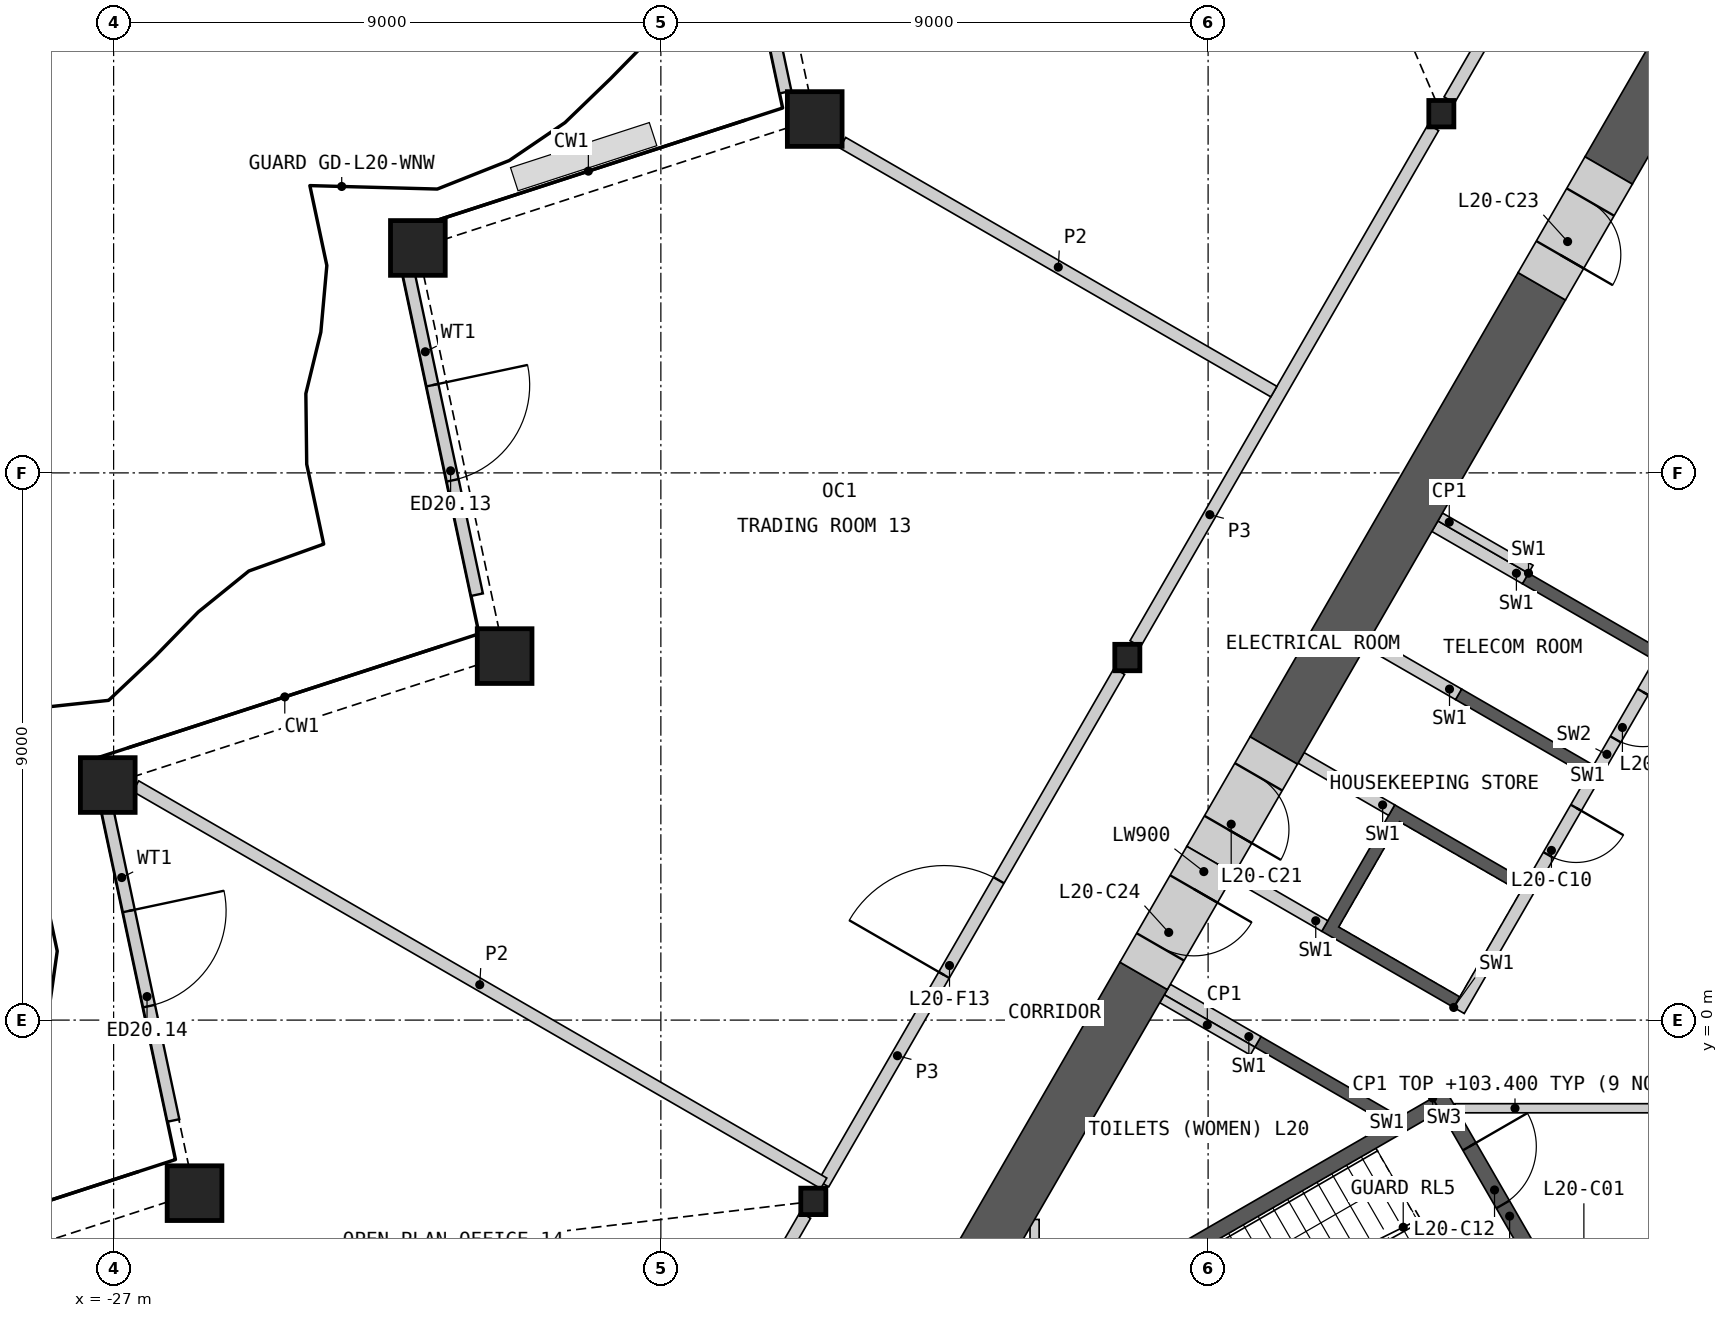
"""IFC4 building model, lengths in metres.
Left out: names, types, materials, properties, quantities, classifications, styles, units other than length and angle.
Written with IfcOpenShell. Run it as: python <this file> out.ifc"""

import sys

from ifc_helpers import new_model, si_unit, direction, frame, frame_2d, origin, origin_2d, place, context, subcontext, project, spatial, polyline, rectangle, hollow_rectangle, i_section, outline, extrude, element, fill, save


model = new_model("IFC4")
c1 = context("Model", 3, precision=1e-05, world=origin(), true_north=direction((0.0, 1.0)))
c2 = subcontext(c1, "Body", "Model", "MODEL_VIEW")
j1 = project(units=[si_unit("LENGTHUNIT", "METRE"), si_unit("PLANEANGLEUNIT", "RADIAN")], contexts=[c1])
p1 = place(None, origin())
s1 = spatial("IfcSite", under=j1, at=p1, CompositionType="ELEMENT")
p2 = place(p1, origin())
s2 = spatial("IfcBuilding", under=s1, at=p2, CompositionType="ELEMENT")
p3 = place(p2, frame((0.0, 0.0, 99.6)))
s3 = spatial("IfcBuildingStorey", under=s2, at=p3, CompositionType="ELEMENT", Elevation=99.6)
for number, where, z_axis, x_axis in (
    (1, (-15.469, 14.82, 0.0), (0.0, 0.0, 1.0), (1.0, 0.0, 0.0)),
    (2, (-21.996, 12.699, 0.0), (0.0, 0.0, 1.0), (1.0, 0.0, 0.0)),
    (3, (-20.57, 5.987, 0.0), (0.0, 0.0, 1.0), (1.0, 0.0, 0.0)),
    (4, (-27.096, 3.866, 0.0), (0.0, 0.0, 1.0), (1.0, 0.0, 0.0)),
    (5, (-25.669, -2.846, 0.0), (0.0, 0.0, 1.0), (1.0, 0.0, 0.0)),
):
    element("IfcColumn", number, at=place(p3, frame(where, z_axis=z_axis, x_axis=x_axis)), inside=s3, PredefinedType="COLUMN", context=c2, shape_type="SweptSolid", body=[
        extrude(hollow_rectangle(XDim=0.9, YDim=0.9, WallThickness=0.06, at=origin_2d()), origin(), (0.0, 0.0, 1.0), 4.2),
    ])
for number, where, z_axis, x_axis in (
    (6, (-5.164, 14.908, 0.0), (0.0, 0.0, 1.0), (1.0, 0.0, 0.0)),
    (7, (-10.328, 5.963, 0.0), (0.0, 0.0, 1.0), (1.0, 0.0, 0.0)),
    (8, (-15.493, -2.982, 0.0), (0.0, 0.0, 1.0), (1.0, 0.0, 0.0)),
):
    element("IfcColumn", number, at=place(p3, frame(where, z_axis=z_axis, x_axis=x_axis)), inside=s3, PredefinedType="COLUMN", context=c2, shape_type="SweptSolid", body=[
        extrude(i_section(OverallWidth=0.412, OverallDepth=0.435, WebThickness=0.036, FlangeThickness=0.057, at=origin_2d()), origin(), (0.0, 0.0, 1.0), 4.2),
    ])
p4 = place(p3, frame((-17.185, 21.066, 0.0), z_axis=(0.0, 0.0, 1.0), x_axis=(0.207930102794, -0.978143686966, 0.0)))
e9 = element("IfcWall", 9, at=p4, inside=s3, PredefinedType="SOLIDWALL", context=c2, shape_type="SweptSolid", body=[
    extrude(rectangle(XDim=5.934, YDim=0.2, at=frame_2d((2.967, 0.0))), origin(), (0.0, 0.0, 1.0), 3.189),
])
p5 = place(p4, frame((2.02, 0.0, 0.0)))
e10 = element("IfcOpeningElement", 10, at=p5, cuts=e9, PredefinedType="OPENING", context=c2, shape_type="SweptSolid", body=[
    extrude(rectangle(XDim=1.6, YDim=2.4, at=frame_2d((0.8, 1.2))), frame((0.0, 0.11, 0.0), z_axis=(0.0, -1.0, 0.0), x_axis=(1.0, 0.0, 0.0)), (0.0, 0.0, 1.0), 0.22),
])
p6 = place(p3, frame((-22.157, 12.324, 0.0), z_axis=(0.0, 0.0, 1.0), x_axis=(0.207903253291, -0.978149394148, 0.0)))
e11 = element("IfcWall", 11, at=p6, inside=s3, PredefinedType="SOLIDWALL", context=c2, shape_type="SweptSolid", body=[
    extrude(rectangle(XDim=5.446, YDim=0.2, at=frame_2d((2.723, 0.0))), origin(), (0.0, 0.0, 1.0), 3.189),
])
p7 = place(p6, frame((1.923, 0.0, 0.0)))
e12 = element("IfcOpeningElement", 12, at=p7, cuts=e11, PredefinedType="OPENING", context=c2, shape_type="SweptSolid", body=[
    extrude(rectangle(XDim=1.6, YDim=2.4, at=frame_2d((0.8, 1.2))), frame((0.0, 0.11, 0.0), z_axis=(0.0, -1.0, 0.0), x_axis=(1.0, 0.0, 0.0)), (0.0, 0.0, 1.0), 0.22),
])
p8 = place(p3, frame((-27.15, 3.676, 0.0), z_axis=(0.0, 0.0, 1.0), x_axis=(0.207912369528, -0.978147456469, 0.0)))
e13 = element("IfcWall", 13, at=p8, inside=s3, PredefinedType="SOLIDWALL", context=c2, shape_type="SweptSolid", body=[
    extrude(rectangle(XDim=5.446, YDim=0.2, at=frame_2d((2.723, 0.0))), origin(), (0.0, 0.0, 1.0), 3.189),
])
p9 = place(p8, frame((1.923, 0.0, 0.0)))
e14 = element("IfcOpeningElement", 14, at=p9, cuts=e13, PredefinedType="OPENING", context=c2, shape_type="SweptSolid", body=[
    extrude(rectangle(XDim=1.6, YDim=2.4, at=frame_2d((0.8, 1.2))), frame((0.0, 0.11, 0.0), z_axis=(0.0, -1.0, 0.0), x_axis=(1.0, 0.0, 0.0)), (0.0, 0.0, 1.0), 0.22),
])
p10 = place(p3, origin())
e15 = element("IfcWall", 15, at=p10, inside=s3, PredefinedType="SHEAR", context=c2, shape_type="SweptSolid", body=[
    extrude(outline(polyline([(-6.061, -1.697), (-8.231, -0.444), (-8.131, -0.271), (-5.96, -1.524), (-6.061, -1.697)])), origin(), (0.0, 0.0, 1.0), 3.8),
])
p11 = place(p3, origin())
e16 = element("IfcWall", 16, at=p11, inside=s3, PredefinedType="SHEAR", context=c2, shape_type="SweptSolid", body=[
    extrude(outline(polyline([(-4.96, 0.208), (-7.131, 1.461), (-5.931, 3.54), (-3.76, 2.287), (-3.861, 2.113), (-5.852, 3.263), (-6.852, 1.531), (-4.861, 0.381), (-4.96, 0.208)])), origin(), (0.0, 0.0, 1.0), 3.8),
])
p12 = place(p3, origin())
e17 = element("IfcWall", 17, at=p12, inside=s3, PredefinedType="SHEAR", context=c2, shape_type="SweptSolid", body=[
    extrude(outline(polyline([(-2.76, 4.019), (-4.931, 5.272), (-4.831, 5.445), (-2.66, 4.192), (-2.76, 4.019)])), origin(), (0.0, 0.0, 1.0), 3.8),
])
p13 = place(p3, origin())
e18 = element("IfcWall", 18, at=p13, inside=s3, PredefinedType="SHEAR", context=c2, shape_type="SweptSolid", body=[
    extrude(outline(polyline([(-3.731, 7.35), (-1.561, 6.097), (-1.66, 5.924), (-3.831, 7.177), (-3.731, 7.35)])), origin(), (0.0, 0.0, 1.0), 3.8),
])
p14 = place(p3, frame((-1.631, 5.776, 0.0), z_axis=(0.0, 0.0, 1.0), x_axis=(-0.499992876559, -0.866029516466, 0.0)))
e19 = element("IfcWall", 19, at=p14, inside=s3, PredefinedType="SOLIDWALL", context=c2, shape_type="SweptSolid", body=[
    extrude(rectangle(XDim=6.486, YDim=0.2, at=frame_2d((3.243, 0.0))), origin(), (0.0, 0.0, 1.0), 3.8),
])
p15 = place(p14, frame((0.437, 0.0, 0.0)))
e20 = element("IfcOpeningElement", 20, at=p15, cuts=e19, PredefinedType="OPENING", context=c2, shape_type="SweptSolid", body=[
    extrude(rectangle(XDim=0.9, YDim=2.1, at=frame_2d((0.45, 1.05))), frame((0.0, 0.11, 0.0), z_axis=(0.0, -1.0, 0.0), x_axis=(1.0, 0.0, 0.0)), (0.0, 0.0, 1.0), 0.22),
])
p16 = place(p14, frame((2.637, 0.0, 0.0)))
e21 = element("IfcOpeningElement", 21, at=p16, cuts=e19, PredefinedType="OPENING", context=c2, shape_type="SweptSolid", body=[
    extrude(rectangle(XDim=0.9, YDim=2.1, at=frame_2d((0.45, 1.05))), frame((0.0, 0.11, 0.0), z_axis=(0.0, -1.0, 0.0), x_axis=(1.0, 0.0, 0.0)), (0.0, 0.0, 1.0), 0.22),
])
for number, where, z_axis, x_axis in (
    (22, (-3.781, 7.263, 0.0), (0.0, 0.0, 1.0), (-0.866, 0.5, 0.0)),
    (23, (-4.881, 5.358, 0.0), (0.0, 0.0, 1.0), (-0.866, 0.5, 0.0)),
):
    element("IfcWall", number, at=place(p3, frame(where, z_axis=z_axis, x_axis=x_axis)), inside=s3, PredefinedType="SHEAR", context=c2, shape_type="SweptSolid", body=[
        extrude(rectangle(XDim=1.72, YDim=0.2, at=frame_2d((0.86, 0.0))), origin(), (0.0, 0.0, 1.0), 3.8),
    ])
p17 = place(p3, frame((-5.981, 3.453, 0.0), z_axis=(0.0, 0.0, 1.0), x_axis=(-0.866060346521, 0.499939472521, 0.0)))
e24 = element("IfcWall", 24, at=p17, inside=s3, PredefinedType="SHEAR", context=c2, shape_type="SweptSolid", body=[
    extrude(rectangle(XDim=1.72, YDim=0.2, at=frame_2d((0.86, 0.0))), origin(), (0.0, 0.0, 1.0), 3.8),
])
for number, where, z_axis, x_axis in (
    (25, (-7.081, 1.548, 0.0), (0.0, 0.0, 1.0), (-0.866, 0.5, 0.0)),
    (26, (-8.181, -0.357, 0.0), (0.0, 0.0, 1.0), (-0.866, 0.5, 0.0)),
):
    element("IfcWall", number, at=place(p3, frame(where, z_axis=z_axis, x_axis=x_axis)), inside=s3, PredefinedType="SHEAR", context=c2, shape_type="SweptSolid", body=[
        extrude(rectangle(XDim=1.72, YDim=0.2, at=frame_2d((0.86, 0.0))), origin(), (0.0, 0.0, 1.0), 3.8),
    ])
p18 = place(p3, frame((-4.941, -1.45, 0.0), z_axis=(0.0, 0.0, 1.0), x_axis=(1.0, 0.0, 0.0)))
e27 = element("IfcWall", 27, at=p18, inside=s3, PredefinedType="PARTITIONING", context=c2, shape_type="SweptSolid", body=[
    extrude(rectangle(XDim=9.882, YDim=0.15, at=frame_2d((4.941, 0.0))), origin(), (0.0, 0.0, 1.0), 3.8),
])
p19 = place(p18, frame((4.391, 0.0, 0.0)))
e28 = element("IfcOpeningElement", 28, at=p19, cuts=e27, PredefinedType="OPENING", context=c2, shape_type="SweptSolid", body=[
    extrude(rectangle(XDim=1.1, YDim=2.1, at=frame_2d((0.55, 1.05))), frame((0.0, 0.085, 0.0), z_axis=(0.0, -1.0, 0.0), x_axis=(1.0, 0.0, 0.0)), (0.0, 0.0, 1.0), 0.17),
])
p20 = place(p3, origin())
e29 = element("IfcWall", 29, at=p20, inside=s3, PredefinedType="SHEAR", context=c2, shape_type="SweptSolid", body=[
    extrude(outline(polyline([(-5.307, -1.281), (-10.374, -4.206), (-10.032, -4.298), (-5.182, -1.498), (-5.307, -1.281)])), origin(), (0.0, 0.0, 1.0), 3.8),
])
p21 = place(p3, frame((-5.199, -1.219, 0.0), z_axis=(0.0, 0.0, 1.0), x_axis=(0.499982516597, -0.866035497597, 0.0)))
e30 = element("IfcWall", 30, at=p21, inside=s3, PredefinedType="SHEAR", context=c2, shape_type="SweptSolid", body=[
    extrude(rectangle(XDim=3.088, YDim=0.25, at=frame_2d((1.544, 0.0))), origin(), (0.0, 0.0, 1.0), 3.8),
])
p22 = place(p21, frame((0.994, 0.0, 0.0)))
e31 = element("IfcOpeningElement", 31, at=p22, cuts=e30, PredefinedType="OPENING", context=c2, shape_type="SweptSolid", body=[
    extrude(rectangle(XDim=1.1, YDim=2.1, at=frame_2d((0.55, 1.05))), frame((0.0, 0.135, 0.0), z_axis=(0.0, -1.0, 0.0), x_axis=(1.0, 0.0, 0.0)), (0.0, 0.0, 1.0), 0.27),
])
for number, where, z_axis, x_axis in (
    (32, (-8.268, -0.509, 0.0), (0.0, 0.0, 1.0), (-0.866, 0.5, 0.0)),
    (33, (-3.693, 7.415, 0.0), (0.0, 0.0, 1.0), (-0.866, 0.5, 0.0)),
):
    element("IfcWall", number, at=place(p3, frame(where, z_axis=z_axis, x_axis=x_axis)), inside=s3, PredefinedType="PARTITIONING", context=c2, shape_type="SweptSolid", body=[
        extrude(rectangle(XDim=1.72, YDim=0.15, at=frame_2d((0.86, 0.0))), origin(), (0.0, 0.0, 1.0), 3.8),
    ])
p23 = place(p3, frame((-11.854, -8.626, 0.0), z_axis=(0.0, 0.0, 1.0), x_axis=(0.0, 1.0, 0.0)))
e34 = element("IfcWall", 34, at=p23, inside=s3, PredefinedType="PARTITIONING", context=c2, shape_type="SweptSolid", body=[
    extrude(rectangle(XDim=5.347, YDim=0.15, at=frame_2d((2.674, 0.0))), origin(), (0.0, 0.0, 1.0), 3.8),
])
p24 = place(p3, frame((-3.512, 12.069, 0.0), z_axis=(0.0, 0.0, 1.0), x_axis=(-0.500002126466, -0.866024176065, 0.0)))
e35 = element("IfcWall", 35, at=p24, inside=s3, PredefinedType="SHEAR", context=c2, shape_type="SweptSolid", body=[
    extrude(rectangle(XDim=8.816, YDim=0.9, at=frame_2d((4.408, 0.0))), origin(), (0.0, 0.0, 1.0), 3.8),
])
p25 = place(p3, frame((-10.06, 0.728, 0.0), z_axis=(0.0, 0.0, 1.0), x_axis=(-0.500002975332, -0.866023685969, 0.0)))
e36 = element("IfcWall", 36, at=p25, inside=s3, PredefinedType="SHEAR", context=c2, shape_type="SweptSolid", body=[
    extrude(rectangle(XDim=6.429, YDim=0.9, at=frame_2d((3.214, 0.0))), origin(), (0.0, 0.0, 1.0), 3.8),
])
p26 = place(p3, frame((-0.39, 17.478, 0.0), z_axis=(0.0, 0.0, 1.0), x_axis=(-0.500046330384, -0.865998653272, 0.0)))
e37 = element("IfcWall", 37, at=p26, inside=s3, PredefinedType="SHEAR", context=c2, shape_type="SweptSolid", body=[
    extrude(rectangle(XDim=4.045, YDim=0.9, at=frame_2d((2.023, 0.0))), origin(), (0.0, 0.0, 1.0), 3.8),
])
p27 = place(p3, frame((-7.92, 4.434, 0.0), z_axis=(0.0, 0.0, 1.0), x_axis=(-0.499939227269, -0.866060488094, 0.0)))
e38 = element("IfcWall", 38, at=p27, inside=s3, PredefinedType="SHEAR", context=c2, shape_type="SweptSolid", body=[
    extrude(rectangle(XDim=2.08, YDim=0.9, at=frame_2d((1.04, 0.0))), origin(), (0.0, 0.0, 1.0), 3.8),
])
p28 = place(p27, frame((0.5, 0.0, 0.0)))
e39 = element("IfcOpeningElement", 39, at=p28, cuts=e38, PredefinedType="OPENING", context=c2, shape_type="SweptSolid", body=[
    extrude(rectangle(XDim=1.0, YDim=2.1, at=frame_2d((0.5, 1.05))), frame((0.0, 0.46, 0.0), z_axis=(0.0, -1.0, 0.0), x_axis=(1.0, 0.0, 0.0)), (0.0, 0.0, 1.0), 0.92),
])
p29 = place(p3, frame((-2.413, 13.974, 0.0), z_axis=(0.0, 0.0, 1.0), x_axis=(-0.499946605688, -0.86605622881, 0.0)))
e40 = element("IfcWall", 40, at=p29, inside=s3, PredefinedType="SHEAR", context=c2, shape_type="SweptSolid", body=[
    extrude(rectangle(XDim=2.2, YDim=0.9, at=frame_2d((1.1, 0.0))), origin(), (0.0, 0.0, 1.0), 3.8),
])
p30 = place(p29, frame((0.6, 0.0, 0.0)))
e41 = element("IfcOpeningElement", 41, at=p30, cuts=e40, PredefinedType="OPENING", context=c2, shape_type="SweptSolid", body=[
    extrude(rectangle(XDim=1.0, YDim=2.1, at=frame_2d((0.5, 1.05))), frame((0.0, 0.46, 0.0), z_axis=(0.0, -1.0, 0.0), x_axis=(1.0, 0.0, 0.0)), (0.0, 0.0, 1.0), 0.92),
])
p31 = place(p3, frame((-8.96, 2.633, 0.0), z_axis=(0.0, 0.0, 1.0), x_axis=(-0.50002983664, -0.866008176907, 0.0)))
e42 = element("IfcWall", 42, at=p31, inside=s3, PredefinedType="SHEAR", context=c2, shape_type="SweptSolid", body=[
    extrude(rectangle(XDim=2.2, YDim=0.9, at=frame_2d((1.1, 0.0))), origin(), (0.0, 0.0, 1.0), 3.8),
])
p32 = place(p31, frame((0.55, 0.0, 0.0)))
e43 = element("IfcOpeningElement", 43, at=p32, cuts=e42, PredefinedType="OPENING", context=c2, shape_type="SweptSolid", body=[
    extrude(rectangle(XDim=1.1, YDim=2.1, at=frame_2d((0.55, 1.05))), frame((0.0, 0.46, 0.0), z_axis=(0.0, -1.0, 0.0), x_axis=(1.0, 0.0, 0.0)), (0.0, 0.0, 1.0), 0.92),
])
p33 = place(p3, frame((-10.197, 6.19, 0.0), z_axis=(0.0, 0.0, 1.0), x_axis=(0.500012035596, 0.866018454918, 0.0)))
e44 = element("IfcWall", 44, at=p33, inside=s3, PredefinedType="PARTITIONING", context=c2, shape_type="SweptSolid", body=[
    extrude(rectangle(XDim=9.803, YDim=0.2, at=frame_2d((4.902, 0.0))), origin(), (0.0, 0.0, 1.0), 3.8),
])
p34 = place(p3, frame((-15.326, -2.693, 0.0), z_axis=(0.0, 0.0, 1.0), x_axis=(0.500010522431, 0.866019328571, 0.0)))
e45 = element("IfcWall", 45, at=p34, inside=s3, PredefinedType="PARTITIONING", context=c2, shape_type="SweptSolid", body=[
    extrude(rectangle(XDim=9.733, YDim=0.2, at=frame_2d((4.866, 0.0))), origin(), (0.0, 0.0, 1.0), 3.8),
])
p35 = place(p34, frame((3.966, 0.0, 0.0)))
e46 = element("IfcOpeningElement", 46, at=p35, cuts=e45, PredefinedType="OPENING", context=c2, shape_type="SweptSolid", body=[
    extrude(rectangle(XDim=1.8, YDim=2.1, at=frame_2d((0.9, 1.05))), frame((0.0, 0.11, 0.0), z_axis=(0.0, -1.0, 0.0), x_axis=(1.0, 0.0, 0.0)), (0.0, 0.0, 1.0), 0.22),
])
p36 = place(p3, frame((-5.033, 15.135, 0.0), z_axis=(0.0, 0.0, 1.0), x_axis=(0.499980978912, 0.866036385336, 0.0)))
e47 = element("IfcWall", 47, at=p36, inside=s3, PredefinedType="PARTITIONING", context=c2, shape_type="SweptSolid", body=[
    extrude(rectangle(XDim=6.24, YDim=0.2, at=frame_2d((3.12, 0.0))), origin(), (0.0, 0.0, 1.0), 3.8),
])
p37 = place(p36, frame((2.169, 0.0, 0.0)))
e48 = element("IfcOpeningElement", 48, at=p37, cuts=e47, PredefinedType="OPENING", context=c2, shape_type="SweptSolid", body=[
    extrude(rectangle(XDim=1.8, YDim=2.1, at=frame_2d((0.9, 1.05))), frame((0.0, 0.11, 0.0), z_axis=(0.0, -1.0, 0.0), x_axis=(1.0, 0.0, 0.0)), (0.0, 0.0, 1.0), 0.22),
])
p38 = place(p3, frame((-18.744, -8.613, 0.0), z_axis=(0.0, 0.0, 1.0), x_axis=(0.499997920671, 0.866026604282, 0.0)))
e49 = element("IfcWall", 49, at=p38, inside=s3, PredefinedType="PARTITIONING", context=c2, shape_type="SweptSolid", body=[
    extrude(rectangle(XDim=6.24, YDim=0.2, at=frame_2d((3.12, 0.0))), origin(), (0.0, 0.0, 1.0), 3.8),
])
p39 = place(p38, frame((2.67, 0.0, 0.0)))
e50 = element("IfcOpeningElement", 50, at=p39, cuts=e49, PredefinedType="OPENING", context=c2, shape_type="SweptSolid", body=[
    extrude(rectangle(XDim=1.0, YDim=2.1, at=frame_2d((0.5, 1.05))), frame((0.0, 0.11, 0.0), z_axis=(0.0, -1.0, 0.0), x_axis=(1.0, 0.0, 0.0)), (0.0, 0.0, 1.0), 0.22),
])
p40 = place(p3, frame((-26.636, 3.848, 0.0), z_axis=(0.0, 0.0, 1.0), x_axis=(0.866029068465, -0.499993652534, 0.0)))
e51 = element("IfcWall", 51, at=p40, inside=s3, PredefinedType="PARTITIONING", context=c2, shape_type="SweptSolid", body=[
    extrude(rectangle(XDim=13.066, YDim=0.2, at=frame_2d((6.533, 0.0))), origin(), (0.0, 0.0, 1.0), 2.885),
])
p41 = place(p3, frame((-15.01, 14.431, 0.0), z_axis=(0.0, 0.0, 1.0), x_axis=(0.866019738461, -0.5000098125, 0.0)))
e52 = element("IfcWall", 52, at=p41, inside=s3, PredefinedType="PARTITIONING", context=c2, shape_type="SweptSolid", body=[
    extrude(rectangle(XDim=8.188, YDim=0.2, at=frame_2d((4.094, 0.0))), origin(), (0.0, 0.0, 1.0), 2.885),
])
p42 = place(p7, origin())
e53 = element("IfcDoor", 53, at=p42, inside=s3, OperationType="DOUBLE_DOOR_SINGLE_SWING", PredefinedType="DOOR", context=c2, shape_type="SweptSolid", body=[
    extrude(rectangle(XDim=1.6, YDim=2.4, at=frame_2d((0.8, 1.2))), frame((0.0, 0.025, 0.0), z_axis=(0.0, -1.0, 0.0), x_axis=(1.0, 0.0, 0.0)), (0.0, 0.0, 1.0), 0.05),
])
fill(e12, e53)
p43 = place(p9, origin())
e54 = element("IfcDoor", 54, at=p43, inside=s3, OperationType="DOUBLE_DOOR_SINGLE_SWING", PredefinedType="DOOR", context=c2, shape_type="SweptSolid", body=[
    extrude(rectangle(XDim=1.6, YDim=2.4, at=frame_2d((0.8, 1.2))), frame((0.0, 0.025, 0.0), z_axis=(0.0, -1.0, 0.0), x_axis=(1.0, 0.0, 0.0)), (0.0, 0.0, 1.0), 0.05),
])
fill(e14, e54)
p44 = place(p15, origin())
e55 = element("IfcDoor", 55, at=p44, inside=s3, OperationType="SINGLE_SWING_LEFT", PredefinedType="DOOR", context=c2, shape_type="SweptSolid", body=[
    extrude(rectangle(XDim=0.9, YDim=2.1, at=frame_2d((0.45, 1.05))), frame((0.0, 0.025, 0.0), z_axis=(0.0, -1.0, 0.0), x_axis=(1.0, 0.0, 0.0)), (0.0, 0.0, 1.0), 0.05),
])
fill(e20, e55)
p45 = place(p16, origin())
e56 = element("IfcDoor", 56, at=p45, inside=s3, OperationType="SINGLE_SWING_LEFT", PredefinedType="DOOR", context=c2, shape_type="SweptSolid", body=[
    extrude(rectangle(XDim=0.9, YDim=2.1, at=frame_2d((0.45, 1.05))), frame((0.0, 0.025, 0.0), z_axis=(0.0, -1.0, 0.0), x_axis=(1.0, 0.0, 0.0)), (0.0, 0.0, 1.0), 0.05),
])
fill(e21, e56)
p46 = place(p22, origin())
e57 = element("IfcDoor", 57, at=p46, inside=s3, OperationType="SINGLE_SWING_LEFT", PredefinedType="DOOR", context=c2, shape_type="SweptSolid", body=[
    extrude(rectangle(XDim=1.1, YDim=2.1, at=frame_2d((0.55, 1.05))), frame((0.0, 0.025, 0.0), z_axis=(0.0, -1.0, 0.0), x_axis=(1.0, 0.0, 0.0)), (0.0, 0.0, 1.0), 0.05),
])
fill(e31, e57)
p47 = place(p28, origin())
e58 = element("IfcDoor", 58, at=p47, inside=s3, OperationType="SINGLE_SWING_RIGHT", PredefinedType="DOOR", context=c2, shape_type="SweptSolid", body=[
    extrude(rectangle(XDim=1.0, YDim=2.1, at=frame_2d((0.5, 1.05))), frame((0.0, 0.205, 0.0), z_axis=(0.0, -1.0, 0.0), x_axis=(1.0, 0.0, 0.0)), (0.0, 0.0, 1.0), 0.05),
])
fill(e39, e58)
p48 = place(p30, origin())
e59 = element("IfcDoor", 59, at=p48, inside=s3, OperationType="SINGLE_SWING_RIGHT", PredefinedType="DOOR", context=c2, shape_type="SweptSolid", body=[
    extrude(rectangle(XDim=1.0, YDim=2.1, at=frame_2d((0.5, 1.05))), frame((0.0, 0.205, 0.0), z_axis=(0.0, -1.0, 0.0), x_axis=(1.0, 0.0, 0.0)), (0.0, 0.0, 1.0), 0.05),
])
fill(e41, e59)
p49 = place(p32, origin())
e60 = element("IfcDoor", 60, at=p49, inside=s3, OperationType="SINGLE_SWING_LEFT", PredefinedType="DOOR", context=c2, shape_type="SweptSolid", body=[
    extrude(rectangle(XDim=1.1, YDim=2.1, at=frame_2d((0.55, 1.05))), frame((0.0, 0.205, 0.0), z_axis=(0.0, -1.0, 0.0), x_axis=(1.0, 0.0, 0.0)), (0.0, 0.0, 1.0), 0.05),
])
fill(e43, e60)
p50 = place(p35, origin())
e61 = element("IfcDoor", 61, at=p50, inside=s3, OperationType="DOUBLE_DOOR_SINGLE_SWING", PredefinedType="DOOR", context=c2, shape_type="SweptSolid", body=[
    extrude(rectangle(XDim=1.8, YDim=2.1, at=frame_2d((0.9, 1.05))), frame((0.0, 0.025, 0.0), z_axis=(0.0, -1.0, 0.0), x_axis=(1.0, 0.0, 0.0)), (0.0, 0.0, 1.0), 0.05),
])
fill(e46, e61)
save(model, sys.argv[1])
